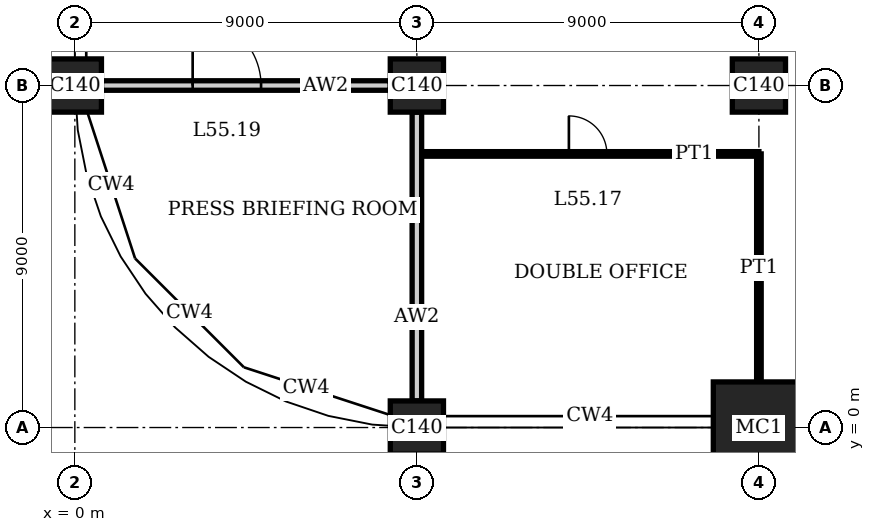
"""IFC4 building model, lengths in metres.
Left out: names, types, materials, properties, quantities, classifications, styles, units other than length and angle.
Written with IfcOpenShell. Run it as: python <this file> out.ifc"""

import sys

from ifc_helpers import new_model, si_unit, direction, frame, frame_2d, origin, origin_2d, place, context, subcontext, project, spatial, rectangle, extrude, element, fill, save


model = new_model("IFC4")
c1 = context("Model", 3, precision=1e-05, world=origin(), true_north=direction((0.0, 1.0)))
c2 = subcontext(c1, "Body", "Model", "MODEL_VIEW")
j1 = project(units=[si_unit("LENGTHUNIT", "METRE"), si_unit("PLANEANGLEUNIT", "RADIAN")], contexts=[c1])
p1 = place(None, origin())
s1 = spatial("IfcSite", under=j1, at=p1, CompositionType="ELEMENT")
p2 = place(p1, origin())
s2 = spatial("IfcBuilding", under=s1, at=p2, CompositionType="ELEMENT")
p3 = place(p2, frame((0.0, 0.0, 226.2)))
s3 = spatial("IfcBuildingStorey", under=s2, at=p3, CompositionType="ELEMENT", Elevation=226.2)
for number, where, z_axis, x_axis in (
    (1, (0.0, 9.0, 0.0), (0.0, 0.0, 1.0), (1.0, 0.0, 0.0)),
    (2, (9.0, 0.0, 0.0), (0.0, 0.0, 1.0), (1.0, 0.0, 0.0)),
    (3, (9.0, 9.0, 0.0), (0.0, 0.0, 1.0), (1.0, 0.0, 0.0)),
):
    element("IfcColumn", number, at=place(p3, frame(where, z_axis=z_axis, x_axis=x_axis)), inside=s3, PredefinedType="COLUMN", context=c2, shape_type="SweptSolid", body=[
        extrude(rectangle(XDim=1.4, YDim=1.4, at=origin_2d()), origin(), (0.0, 0.0, 1.0), 4.0),
    ])
p4 = place(p3, frame((18.0, 0.0, 0.0), z_axis=(0.0, 0.0, 1.0), x_axis=(1.0, 0.0, 0.0)))
e4 = element("IfcColumn", 4, at=p4, inside=s3, PredefinedType="COLUMN", context=c2, shape_type="SweptSolid", body=[
    extrude(rectangle(XDim=2.4, YDim=2.4, at=origin_2d()), origin(), (0.0, 0.0, 1.0), 4.0),
])
p5 = place(p3, frame((18.0, 9.0, 0.0), z_axis=(0.0, 0.0, 1.0), x_axis=(1.0, 0.0, 0.0)))
e5 = element("IfcColumn", 5, at=p5, inside=s3, PredefinedType="COLUMN", context=c2, shape_type="SweptSolid", body=[
    extrude(rectangle(XDim=1.4, YDim=1.4, at=origin_2d()), origin(), (0.0, 0.0, 1.0), 4.0),
])
p6 = place(p3, frame((9.0, 7.2, 0.0), z_axis=(0.0, 0.0, 1.0), x_axis=(1.0, 0.0, 0.0)))
e6 = element("IfcWall", 6, at=p6, inside=s3, PredefinedType="PARTITIONING", context=c2, shape_type="SweptSolid", body=[
    extrude(rectangle(XDim=9.0, YDim=0.12, at=frame_2d((4.5, 0.0))), origin(), (0.0, 0.0, 1.0), 3.75),
])
p7 = place(p6, frame((4.0, 0.0, 0.0)))
e7 = element("IfcOpeningElement", 7, at=p7, cuts=e6, PredefinedType="OPENING", context=c2, shape_type="SweptSolid", body=[
    extrude(rectangle(XDim=1.0, YDim=2.4, at=frame_2d((0.5, 1.2))), frame((0.0, 0.07, 0.0), z_axis=(0.0, -1.0, 0.0), x_axis=(1.0, 0.0, 0.0)), (0.0, 0.0, 1.0), 0.14),
])
p8 = place(p3, frame((0.7, 9.0, 0.0), z_axis=(0.0, 0.0, 1.0), x_axis=(1.0, 0.0, 0.0)))
e8 = element("IfcWall", 8, at=p8, inside=s3, PredefinedType="PARTITIONING", context=c2, shape_type="SweptSolid", body=[
    extrude(rectangle(XDim=7.6, YDim=0.25, at=frame_2d((3.8, 0.0))), origin(), (0.0, 0.0, 1.0), 3.05),
])
p9 = place(p8, frame((2.4, 0.0, 0.0)))
e9 = element("IfcOpeningElement", 9, at=p9, cuts=e8, PredefinedType="OPENING", context=c2, shape_type="SweptSolid", body=[
    extrude(rectangle(XDim=1.8, YDim=2.4, at=frame_2d((0.9, 1.2))), frame((0.0, 0.135, 0.0), z_axis=(0.0, -1.0, 0.0), x_axis=(1.0, 0.0, 0.0)), (0.0, 0.0, 1.0), 0.27),
])
p10 = place(p3, frame((9.0, 0.7, 0.0), z_axis=(0.0, 0.0, 1.0), x_axis=(0.0, 1.0, 0.0)))
e10 = element("IfcWall", 10, at=p10, inside=s3, PredefinedType="PARTITIONING", context=c2, shape_type="SweptSolid", body=[
    extrude(rectangle(XDim=7.6, YDim=0.25, at=frame_2d((3.8, 0.0))), origin(), (0.0, 0.0, 1.0), 3.05),
])
p11 = place(p3, frame((18.0, 1.2, 0.0), z_axis=(0.0, 0.0, 1.0), x_axis=(0.0, 1.0, 0.0)))
e11 = element("IfcWall", 11, at=p11, inside=s3, PredefinedType="PARTITIONING", context=c2, shape_type="SweptSolid", body=[
    extrude(rectangle(XDim=6.0, YDim=0.12, at=frame_2d((3.0, 0.0))), origin(), (0.0, 0.0, 1.0), 3.05),
])
p12 = place(p7, origin())
e12 = element("IfcDoor", 12, at=p12, inside=s3, OperationType="SINGLE_SWING_RIGHT", PredefinedType="DOOR", context=c2, shape_type="SweptSolid", body=[
    extrude(rectangle(XDim=1.0, YDim=2.4, at=frame_2d((0.5, 1.2))), frame((0.0, 0.025, 0.0), z_axis=(0.0, -1.0, 0.0), x_axis=(1.0, 0.0, 0.0)), (0.0, 0.0, 1.0), 0.05),
])
fill(e7, e12)
p13 = place(p9, origin())
e13 = element("IfcDoor", 13, at=p13, inside=s3, OperationType="DOUBLE_DOOR_SINGLE_SWING", PredefinedType="DOOR", context=c2, shape_type="SweptSolid", body=[
    extrude(rectangle(XDim=1.8, YDim=2.4, at=frame_2d((0.9, 1.2))), frame((0.0, 0.025, 0.0), z_axis=(0.0, -1.0, 0.0), x_axis=(1.0, 0.0, 0.0)), (0.0, 0.0, 1.0), 0.05),
])
fill(e9, e13)
save(model, sys.argv[1])
